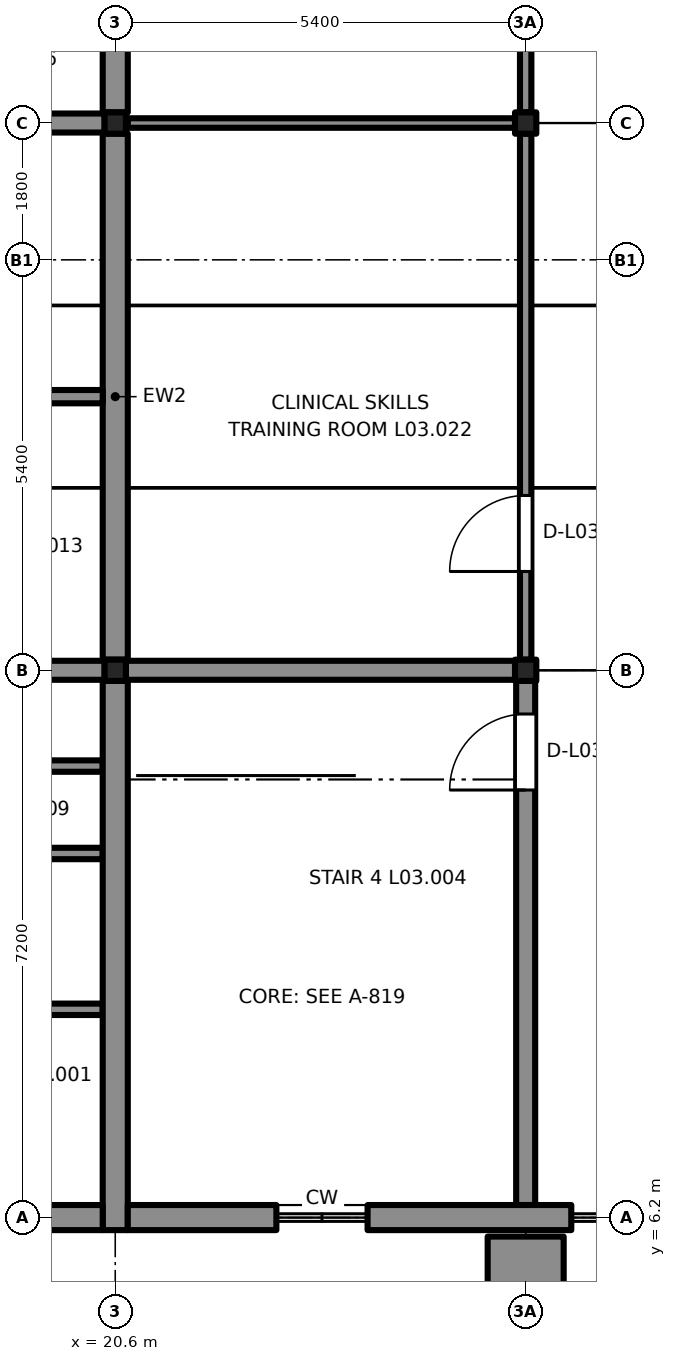
"""IFC4 building model, lengths in metres.
Left out: names, types, materials, properties, quantities, classifications, styles, units other than length and angle.
Written with IfcOpenShell. Run it as: python <this file> out.ifc"""

import sys

from ifc_helpers import new_model, si_unit, direction, frame, frame_2d, origin, origin_2d, place, context, subcontext, project, spatial, rectangle, extrude, element, fill, save


model = new_model("IFC4")
c1 = context("Model", 3, precision=1e-05, world=origin(), true_north=direction((0.0, 1.0)))
c2 = subcontext(c1, "Body", "Model", "MODEL_VIEW")
j1 = project(units=[si_unit("LENGTHUNIT", "METRE"), si_unit("PLANEANGLEUNIT", "RADIAN")], contexts=[c1])
p1 = place(None, origin())
s1 = spatial("IfcSite", under=j1, at=p1, CompositionType="ELEMENT")
p2 = place(p1, origin())
s2 = spatial("IfcBuilding", under=s1, at=p2, CompositionType="ELEMENT")
p3 = place(p2, frame((0.0, 0.0, 14.1)))
s3 = spatial("IfcBuildingStorey", under=s2, at=p3, CompositionType="ELEMENT", Elevation=14.1)
for number, where, z_axis, x_axis in (
    (1, (20.6, 13.4, 0.0), (0.0, 0.0, 1.0), (1.0, 0.0, 0.0)),
    (2, (20.6, 20.6, 0.0), (0.0, 0.0, 1.0), (1.0, 0.0, 0.0)),
    (3, (26.0, 13.4, 0.0), (0.0, 0.0, 1.0), (1.0, 0.0, 0.0)),
    (4, (26.0, 20.6, 0.0), (0.0, 0.0, 1.0), (1.0, 0.0, 0.0)),
):
    element("IfcColumn", number, at=place(p3, frame(where, z_axis=z_axis, x_axis=x_axis)), inside=s3, PredefinedType="COLUMN", context=c2, shape_type="SweptSolid", body=[
        extrude(rectangle(XDim=0.28, YDim=0.28, at=origin_2d()), origin(), (0.0, 0.0, 1.0), 3.9),
    ])
p4 = place(p3, frame((15.34, 13.4, 0.0), z_axis=(0.0, 0.0, 1.0), x_axis=(1.0, 0.0, 0.0)))
e5 = element("IfcWall", 5, at=p4, inside=s3, PredefinedType="SHEAR", context=c2, shape_type="SweptSolid", body=[
    extrude(rectangle(XDim=5.12, YDim=0.25, at=frame_2d((2.56, 0.0))), origin(), (0.0, 0.0, 1.0), 3.2),
])
for number, where, z_axis, x_axis in (
    (6, (15.325, 8.94, 0.0), (0.0, 0.0, 1.0), (1.0, 0.0, 0.0)),
    (7, (15.325, 10.99, 0.0), (0.0, 0.0, 1.0), (1.0, 0.0, 0.0)),
    (8, (15.325, 12.14, 0.0), (0.0, 0.0, 1.0), (1.0, 0.0, 0.0)),
):
    element("IfcWall", number, at=place(p3, frame(where, z_axis=z_axis, x_axis=x_axis)), inside=s3, PredefinedType="PARTITIONING", context=c2, shape_type="SweptSolid", body=[
        extrude(rectangle(XDim=5.11, YDim=0.15, at=frame_2d((2.555, 0.0))), origin(), (0.0, 0.0, 1.0), 3.2),
    ])
p5 = place(p3, frame((15.34, 20.6, 0.0), z_axis=(0.0, 0.0, 1.0), x_axis=(1.0, 0.0, 0.0)))
e9 = element("IfcWall", 9, at=p5, inside=s3, PredefinedType="SHEAR", context=c2, shape_type="SweptSolid", body=[
    extrude(rectangle(XDim=5.12, YDim=0.25, at=frame_2d((2.56, 0.0))), origin(), (0.0, 0.0, 1.0), 3.2),
])
p6 = place(p3, frame((26.0, 6.365, 0.0), z_axis=(0.0, 0.0, 1.0), x_axis=(0.0, 1.0, 0.0)))
e10 = element("IfcWall", 10, at=p6, inside=s3, PredefinedType="SHEAR", context=c2, shape_type="SweptSolid", body=[
    extrude(rectangle(XDim=6.895, YDim=0.25, at=frame_2d((3.448, 0.0))), origin(), (0.0, 0.0, 1.0), 3.2),
])
p7 = place(p6, frame((5.46, 0.0, 0.0)))
e11 = element("IfcOpeningElement", 11, at=p7, cuts=e10, PredefinedType="OPENING", context=c2, shape_type="SweptSolid", body=[
    extrude(rectangle(XDim=1.0, YDim=2.1, at=frame_2d((0.5, 1.05))), frame((0.0, 0.135, 0.0), z_axis=(0.0, -1.0, 0.0), x_axis=(1.0, 0.0, 0.0)), (0.0, 0.0, 1.0), 0.27),
])
p8 = place(p3, frame((20.74, 13.4, 0.0), z_axis=(0.0, 0.0, 1.0), x_axis=(1.0, 0.0, 0.0)))
e12 = element("IfcWall", 12, at=p8, inside=s3, PredefinedType="SHEAR", context=c2, shape_type="SweptSolid", body=[
    extrude(rectangle(XDim=5.12, YDim=0.25, at=frame_2d((2.56, 0.0))), origin(), (0.0, 0.0, 1.0), 3.2),
])
p9 = place(p3, frame((20.6, 13.26, 0.0), z_axis=(0.0, 0.0, 1.0), x_axis=(0.0, -1.0, 0.0)))
e13 = element("IfcWall", 13, at=p9, inside=s3, PredefinedType="SOLIDWALL", context=c2, shape_type="SweptSolid", body=[
    extrude(rectangle(XDim=7.225, YDim=0.33, at=frame_2d((3.613, 0.0))), origin(), (0.0, 0.0, 1.0), 3.2),
])
for number, where, z_axis, x_axis in (
    (14, (20.6, 20.46, 0.0), (0.0, 0.0, 1.0), (0.0, -1.0, 0.0)),
    (15, (20.6, 27.66, 0.0), (0.0, 0.0, 1.0), (0.0, -1.0, 0.0)),
):
    element("IfcWall", number, at=place(p3, frame(where, z_axis=z_axis, x_axis=x_axis)), inside=s3, PredefinedType="SOLIDWALL", context=c2, shape_type="SweptSolid", body=[
        extrude(rectangle(XDim=6.92, YDim=0.33, at=frame_2d((3.46, 0.0))), origin(), (0.0, 0.0, 1.0), 3.2),
    ])
p10 = place(p3, frame((20.435, 6.2, 0.0), z_axis=(0.0, 0.0, 1.0), x_axis=(-1.0, 0.0, 0.0)))
e16 = element("IfcWall", 16, at=p10, inside=s3, PredefinedType="SOLIDWALL", context=c2, shape_type="SweptSolid", body=[
    extrude(rectangle(XDim=5.835, YDim=0.33, at=frame_2d((2.917, 0.0))), origin(), (0.0, 0.0, 1.0), 3.2),
])
p11 = place(p3, frame((22.72, 6.2, 0.0), z_axis=(0.0, 0.0, 1.0), x_axis=(-1.0, 0.0, 0.0)))
e17 = element("IfcWall", 17, at=p11, inside=s3, PredefinedType="SOLIDWALL", context=c2, shape_type="SweptSolid", body=[
    extrude(rectangle(XDim=1.955, YDim=0.33, at=frame_2d((0.978, 0.0))), origin(), (0.0, 0.0, 1.0), 3.2),
])
p12 = place(p3, frame((26.6, 6.2, 0.0), z_axis=(0.0, 0.0, 1.0), x_axis=(-1.0, 0.0, 0.0)))
e18 = element("IfcWall", 18, at=p12, inside=s3, PredefinedType="SOLIDWALL", context=c2, shape_type="SweptSolid", body=[
    extrude(rectangle(XDim=2.68, YDim=0.33, at=frame_2d((1.34, 0.0))), origin(), (0.0, 0.0, 1.0), 3.2),
])
p13 = place(p3, frame((26.5, 5.575, 0.0), z_axis=(0.0, 0.0, 1.0), x_axis=(-1.0, 0.0, 0.0)))
e19 = element("IfcWall", 19, at=p13, inside=s3, PredefinedType="SOLIDWALL", context=c2, shape_type="SweptSolid", body=[
    extrude(rectangle(XDim=1.0, YDim=0.75, at=frame_2d((0.5, 0.0))), origin(), (0.0, 0.0, 1.0), 3.9),
])
p14 = place(p3, frame((23.6, 6.25, 3.9), z_axis=(0.0, 0.0, 1.0), x_axis=(-1.0, 0.0, 0.0)))
e20 = element("IfcWall", 20, at=p14, inside=s3, PredefinedType="SOLIDWALL", context=c2, shape_type="SweptSolid", body=[
    extrude(rectangle(XDim=1.5, YDim=0.23, at=frame_2d((0.75, 0.0))), origin(), (0.0, 0.0, 1.0), 2.4),
])
p15 = place(p3, frame((24.8, 6.25, 3.9), z_axis=(0.0, 0.0, 1.0), x_axis=(-1.0, 0.0, 0.0)))
e21 = element("IfcWall", 21, at=p15, inside=s3, PredefinedType="SOLIDWALL", context=c2, shape_type="SweptSolid", body=[
    extrude(rectangle(XDim=1.2, YDim=0.23, at=frame_2d((0.6, 0.0))), origin(), (0.0, 0.0, 1.0), 3.4),
])
p16 = place(p3, frame((26.3, 6.25, 3.9), z_axis=(0.0, 0.0, 1.0), x_axis=(-1.0, 0.0, 0.0)))
e22 = element("IfcWall", 22, at=p16, inside=s3, PredefinedType="SOLIDWALL", context=c2, shape_type="SweptSolid", body=[
    extrude(rectangle(XDim=1.5, YDim=0.23, at=frame_2d((0.75, 0.0))), origin(), (0.0, 0.0, 1.0), 2.4),
])
p17 = place(p3, frame((27.8, 6.25, 3.9), z_axis=(0.0, 0.0, 1.0), x_axis=(-1.0, 0.0, 0.0)))
e23 = element("IfcWall", 23, at=p17, inside=s3, PredefinedType="SOLIDWALL", context=c2, shape_type="SweptSolid", body=[
    extrude(rectangle(XDim=1.5, YDim=0.23, at=frame_2d((0.75, 0.0))), origin(), (0.0, 0.0, 1.0), 1.4),
])
p18 = place(p3, frame((20.435, 17.0, 0.0), z_axis=(0.0, 0.0, 1.0), x_axis=(-1.0, 0.0, 0.0)))
e24 = element("IfcWall", 24, at=p18, inside=s3, PredefinedType="PARTITIONING", context=c2, shape_type="SweptSolid", body=[
    extrude(rectangle(XDim=5.147, YDim=0.175, at=frame_2d((2.574, 0.0))), origin(), (0.0, 0.0, 1.0), 5.485),
])
p19 = place(p3, frame((26.0, 13.54, 0.0), z_axis=(0.0, 0.0, 1.0), x_axis=(0.0, 1.0, 0.0)))
e25 = element("IfcWall", 25, at=p19, inside=s3, PredefinedType="PARTITIONING", context=c2, shape_type="SweptSolid", body=[
    extrude(rectangle(XDim=6.92, YDim=0.15, at=frame_2d((3.46, 0.0))), origin(), (0.0, 0.0, 1.0), 5.233),
])
p20 = place(p19, frame((1.16, 0.0, 0.0)))
e26 = element("IfcOpeningElement", 26, at=p20, cuts=e25, PredefinedType="OPENING", context=c2, shape_type="SweptSolid", body=[
    extrude(rectangle(XDim=1.0, YDim=2.1, at=frame_2d((0.5, 1.05))), frame((0.0, 0.085, 0.0), z_axis=(0.0, -1.0, 0.0), x_axis=(1.0, 0.0, 0.0)), (0.0, 0.0, 1.0), 0.17),
])
p21 = place(p3, frame((26.0, 20.74, 0.0), z_axis=(0.0, 0.0, 1.0), x_axis=(0.0, 1.0, 0.0)))
e27 = element("IfcWall", 27, at=p21, inside=s3, PredefinedType="PARTITIONING", context=c2, shape_type="SweptSolid", body=[
    extrude(rectangle(XDim=6.92, YDim=0.15, at=frame_2d((3.46, 0.0))), origin(), (0.0, 0.0, 1.0), 5.233),
])
p22 = place(p21, frame((1.16, 0.0, 0.0)))
e28 = element("IfcOpeningElement", 28, at=p22, cuts=e27, PredefinedType="OPENING", context=c2, shape_type="SweptSolid", body=[
    extrude(rectangle(XDim=1.0, YDim=2.1, at=frame_2d((0.5, 1.05))), frame((0.0, 0.085, 0.0), z_axis=(0.0, -1.0, 0.0), x_axis=(1.0, 0.0, 0.0)), (0.0, 0.0, 1.0), 0.17),
])
p23 = place(p3, frame((20.765, 20.6, 0.0), z_axis=(0.0, 0.0, 1.0), x_axis=(1.0, 0.0, 0.0)))
e29 = element("IfcWall", 29, at=p23, inside=s3, PredefinedType="PARTITIONING", context=c2, shape_type="SweptSolid", body=[
    extrude(rectangle(XDim=5.095, YDim=0.125, at=frame_2d((2.548, 0.0))), origin(), (0.0, 0.0, 1.0), 3.9),
])
p24 = place(p7, origin())
e30 = element("IfcDoor", 30, at=p24, inside=s3, OperationType="SINGLE_SWING_RIGHT", PredefinedType="DOOR", context=c2, shape_type="SweptSolid", body=[
    extrude(rectangle(XDim=1.0, YDim=2.1, at=frame_2d((0.5, 1.05))), frame((0.0, 0.025, 0.0), z_axis=(0.0, -1.0, 0.0), x_axis=(1.0, 0.0, 0.0)), (0.0, 0.0, 1.0), 0.05),
])
fill(e11, e30)
p25 = place(p20, origin())
e31 = element("IfcDoor", 31, at=p25, inside=s3, OperationType="SINGLE_SWING_LEFT", PredefinedType="DOOR", context=c2, shape_type="SweptSolid", body=[
    extrude(rectangle(XDim=1.0, YDim=2.1, at=frame_2d((0.5, 1.05))), frame((0.0, 0.025, 0.0), z_axis=(0.0, -1.0, 0.0), x_axis=(1.0, 0.0, 0.0)), (0.0, 0.0, 1.0), 0.05),
])
fill(e26, e31)
save(model, sys.argv[1])
